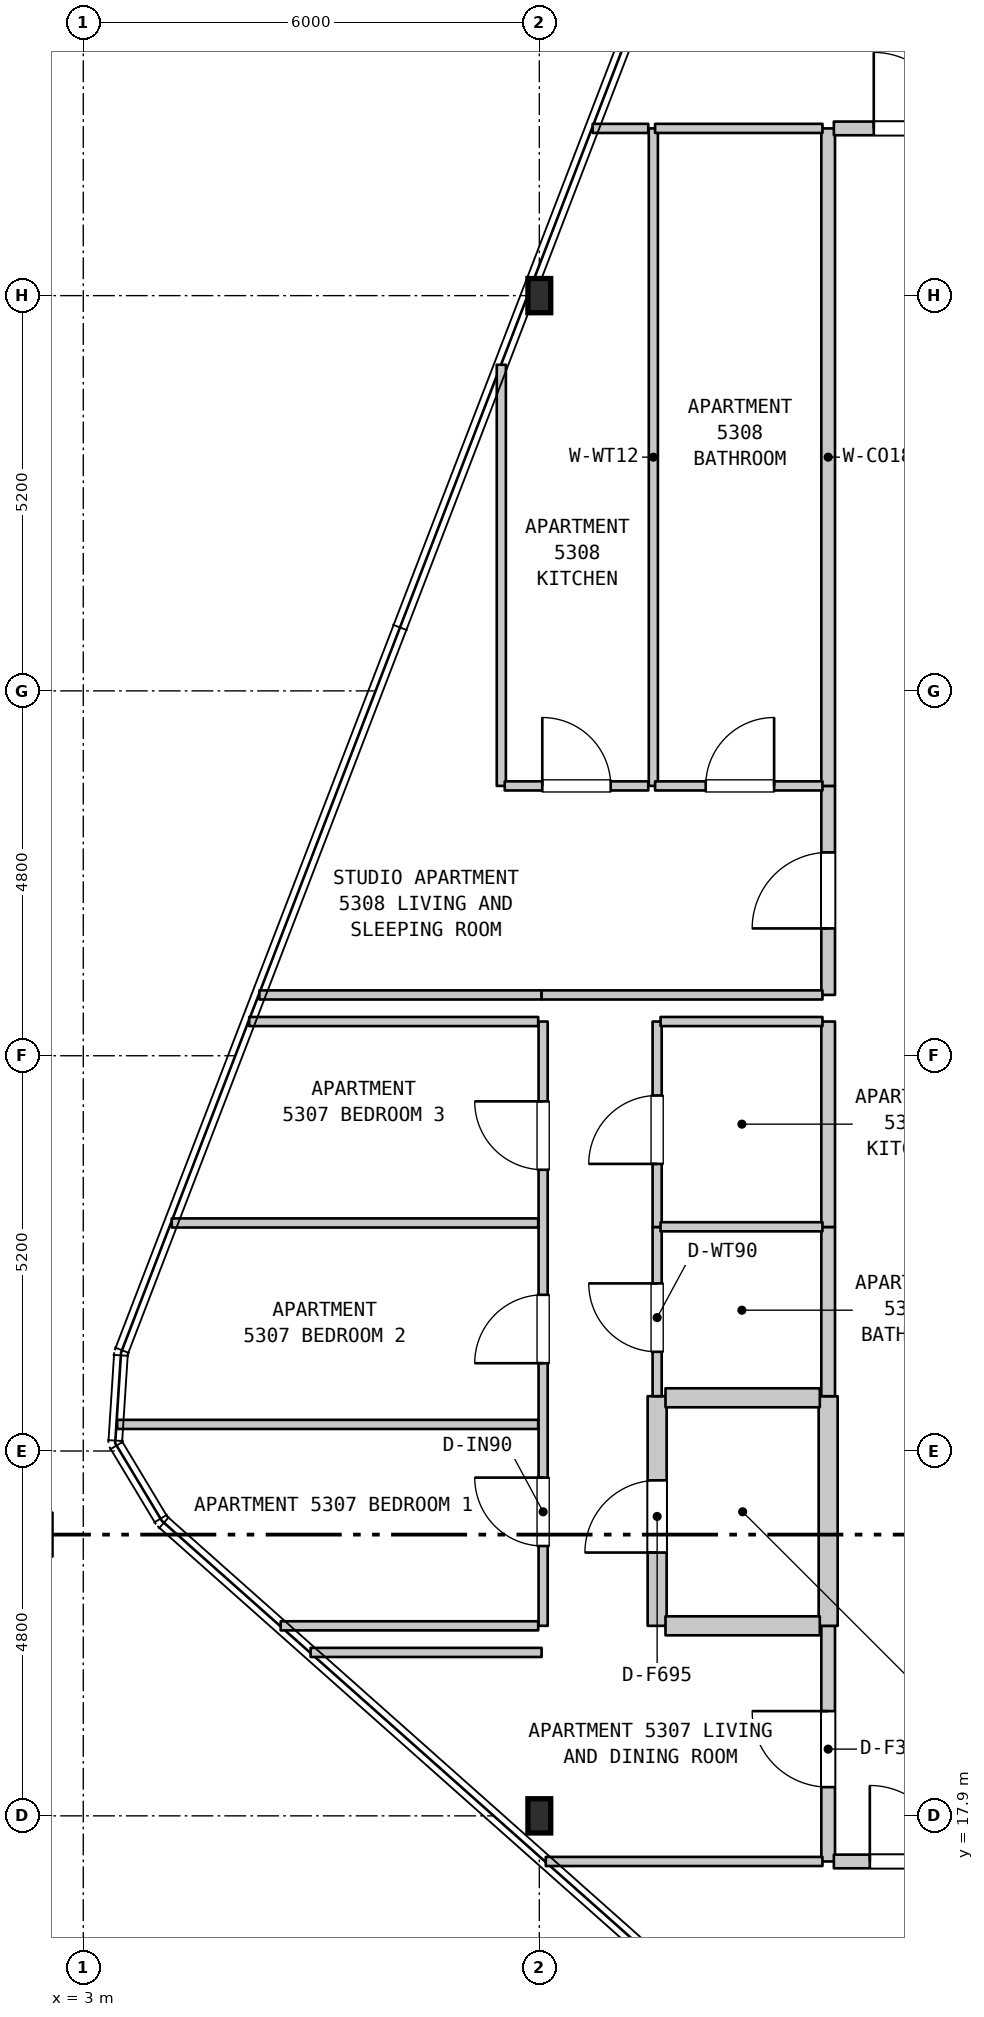
"""IFC4 building model, lengths in metres.
Left out: names, types, materials, properties, quantities, classifications, styles, units other than length and angle.
Written with IfcOpenShell. Run it as: python <this file> out.ifc"""

import sys

from ifc_helpers import new_model, si_unit, direction, frame, frame_2d, origin, origin_2d, place, context, subcontext, project, spatial, rectangle, i_section, extrude, element, fill, save


model = new_model("IFC4")
c1 = context("Model", 3, precision=1e-05, world=origin(), true_north=direction((0.0, 1.0)))
c2 = subcontext(c1, "Body", "Model", "MODEL_VIEW")
j1 = project(units=[si_unit("LENGTHUNIT", "METRE"), si_unit("PLANEANGLEUNIT", "RADIAN")], contexts=[c1])
p1 = place(None, origin())
s1 = spatial("IfcSite", under=j1, at=p1, CompositionType="ELEMENT")
p2 = place(p1, origin())
s2 = spatial("IfcBuilding", under=s1, at=p2, CompositionType="ELEMENT")
p3 = place(p2, frame((0.0, 0.0, 214.3)))
s3 = spatial("IfcBuildingStorey", under=s2, at=p3, CompositionType="ELEMENT", Elevation=214.3)
for number, where, z_axis, x_axis in (
    (1, (9.0, 17.9, 0.0), (0.0, 0.0, 1.0), (1.0, 0.0, 0.0)),
    (2, (9.0, 37.9, 0.0), (0.0, 0.0, 1.0), (1.0, 0.0, 0.0)),
):
    element("IfcColumn", number, at=place(p3, frame(where, z_axis=z_axis, x_axis=x_axis)), inside=s3, PredefinedType="COLUMN", context=c2, shape_type="SweptSolid", body=[
        extrude(i_section(OverallWidth=0.3, OverallDepth=0.45, WebThickness=0.014, FlangeThickness=0.026, FilletRadius=0.027, at=origin_2d()), origin(), (0.0, 0.0, 1.0), 3.7),
    ])
p4 = place(p3, frame((8.5, 31.45, 0.0), z_axis=(0.0, 0.0, 1.0), x_axis=(0.0, 1.0, 0.0)))
e3 = element("IfcWall", 3, at=p4, inside=s3, PredefinedType="PARTITIONING", context=c2, shape_type="SweptSolid", body=[
    extrude(rectangle(XDim=5.54, YDim=0.12, at=frame_2d((2.77, 0.0))), origin(), (0.0, 0.0, 1.0), 3.38),
])
p5 = place(p3, frame((9.05, 20.4, 0.0), z_axis=(0.0, 0.0, 1.0), x_axis=(0.0, 1.0, 0.0)))
e4 = element("IfcWall", 4, at=p5, inside=s3, PredefinedType="PARTITIONING", context=c2, shape_type="SweptSolid", body=[
    extrude(rectangle(XDim=7.95, YDim=0.12, at=frame_2d((3.975, 0.0))), origin(), (0.0, 0.0, 1.0), 2.78),
])
p6 = place(p5, frame((1.05, 0.0, 0.0)))
e5 = element("IfcOpeningElement", 5, at=p6, cuts=e4, PredefinedType="OPENING", context=c2, shape_type="SweptSolid", body=[
    extrude(rectangle(XDim=0.9, YDim=2.15, at=frame_2d((0.45, 1.075))), frame((0.0, 0.07, 0.0), z_axis=(0.0, -1.0, 0.0), x_axis=(1.0, 0.0, 0.0)), (0.0, 0.0, 1.0), 0.14),
])
p7 = place(p5, frame((3.455, 0.0, 0.0)))
e6 = element("IfcOpeningElement", 6, at=p7, cuts=e4, PredefinedType="OPENING", context=c2, shape_type="SweptSolid", body=[
    extrude(rectangle(XDim=0.9, YDim=2.15, at=frame_2d((0.45, 1.075))), frame((0.0, 0.07, 0.0), z_axis=(0.0, -1.0, 0.0), x_axis=(1.0, 0.0, 0.0)), (0.0, 0.0, 1.0), 0.14),
])
p8 = place(p5, frame((6.0, 0.0, 0.0)))
e7 = element("IfcOpeningElement", 7, at=p8, cuts=e4, PredefinedType="OPENING", context=c2, shape_type="SweptSolid", body=[
    extrude(rectangle(XDim=0.9, YDim=2.15, at=frame_2d((0.45, 1.075))), frame((0.0, 0.07, 0.0), z_axis=(0.0, -1.0, 0.0), x_axis=(1.0, 0.0, 0.0)), (0.0, 0.0, 1.0), 0.14),
])
p9 = place(p3, frame((10.5, 31.45, 0.0), z_axis=(0.0, 0.0, 1.0), x_axis=(0.0, 1.0, 0.0)))
e8 = element("IfcWall", 8, at=p9, inside=s3, PredefinedType="PARTITIONING", context=c2, shape_type="SweptSolid", body=[
    extrude(rectangle(XDim=8.65, YDim=0.12, at=frame_2d((4.325, 0.0))), origin(), (0.0, 0.0, 1.0), 3.38),
])
p10 = place(p3, frame((10.55, 20.4, 0.0), z_axis=(0.0, 0.0, 1.0), x_axis=(0.0, 1.0, 0.0)))
e9 = element("IfcWall", 9, at=p10, inside=s3, PredefinedType="STANDARD", context=c2, shape_type="SweptSolid", body=[
    extrude(rectangle(XDim=3.021, YDim=0.25, at=frame_2d((1.51, 0.0))), origin(), (0.0, 0.0, 1.0), 3.38),
])
p11 = place(p10, frame((0.964, 0.0, 0.0)))
e10 = element("IfcOpeningElement", 10, at=p11, cuts=e9, PredefinedType="OPENING", context=c2, shape_type="SweptSolid", body=[
    extrude(rectangle(XDim=0.95, YDim=2.15, at=frame_2d((0.475, 1.075))), frame((0.0, 0.135, 0.0), z_axis=(0.0, -1.0, 0.0), x_axis=(1.0, 0.0, 0.0)), (0.0, 0.0, 1.0), 0.27),
])
p12 = place(p3, frame((10.55, 23.421, 0.0), z_axis=(0.0, 0.0, 1.0), x_axis=(0.0, 1.0, 0.0)))
e11 = element("IfcWall", 11, at=p12, inside=s3, PredefinedType="PARTITIONING", context=c2, shape_type="SweptSolid", body=[
    extrude(rectangle(XDim=2.226, YDim=0.12, at=frame_2d((1.113, 0.0))), origin(), (0.0, 0.0, 1.0), 3.38),
])
p13 = place(p12, frame((0.584, 0.0, 0.0)))
e12 = element("IfcOpeningElement", 12, at=p13, cuts=e11, PredefinedType="OPENING", context=c2, shape_type="SweptSolid", body=[
    extrude(rectangle(XDim=0.9, YDim=2.1, at=frame_2d((0.45, 1.05))), frame((0.0, 0.07, 0.0), z_axis=(0.0, -1.0, 0.0), x_axis=(1.0, 0.0, 0.0)), (0.0, 0.0, 1.0), 0.14),
])
p14 = place(p3, frame((10.55, 25.647, 0.0), z_axis=(0.0, 0.0, 1.0), x_axis=(0.0, 1.0, 0.0)))
e13 = element("IfcWall", 13, at=p14, inside=s3, PredefinedType="PARTITIONING", context=c2, shape_type="SweptSolid", body=[
    extrude(rectangle(XDim=2.703, YDim=0.12, at=frame_2d((1.352, 0.0))), origin(), (0.0, 0.0, 1.0), 3.38),
])
p15 = place(p14, frame((0.83, 0.0, 0.0)))
e14 = element("IfcOpeningElement", 14, at=p15, cuts=e13, PredefinedType="OPENING", context=c2, shape_type="SweptSolid", body=[
    extrude(rectangle(XDim=0.9, YDim=2.15, at=frame_2d((0.45, 1.075))), frame((0.0, 0.07, 0.0), z_axis=(0.0, -1.0, 0.0), x_axis=(1.0, 0.0, 0.0)), (0.0, 0.0, 1.0), 0.14),
])
p16 = place(p3, frame((12.8, 17.3, 0.0), z_axis=(0.0, 0.0, 1.0), x_axis=(0.0, 1.0, 0.0)))
e15 = element("IfcWall", 15, at=p16, inside=s3, PredefinedType="STANDARD", context=c2, shape_type="SweptSolid", body=[
    extrude(rectangle(XDim=3.1, YDim=0.18, at=frame_2d((1.55, 0.0))), origin(), (0.0, 0.0, 1.0), 3.38),
])
p17 = place(p16, frame((0.978, 0.0, 0.0)))
e16 = element("IfcOpeningElement", 16, at=p17, cuts=e15, PredefinedType="OPENING", context=c2, shape_type="SweptSolid", body=[
    extrude(rectangle(XDim=1.0, YDim=2.15, at=frame_2d((0.5, 1.075))), frame((0.0, 0.1, 0.0), z_axis=(0.0, -1.0, 0.0), x_axis=(1.0, 0.0, 0.0)), (0.0, 0.0, 1.0), 0.2),
])
p18 = place(p3, frame((12.8, 20.4, 0.0), z_axis=(0.0, 0.0, 1.0), x_axis=(0.0, 1.0, 0.0)))
e17 = element("IfcWall", 17, at=p18, inside=s3, PredefinedType="STANDARD", context=c2, shape_type="SweptSolid", body=[
    extrude(rectangle(XDim=3.021, YDim=0.25, at=frame_2d((1.51, 0.0))), origin(), (0.0, 0.0, 1.0), 3.38),
])
p19 = place(p3, frame((12.8, 23.421, 0.0), z_axis=(0.0, 0.0, 1.0), x_axis=(0.0, 1.0, 0.0)))
e18 = element("IfcWall", 18, at=p19, inside=s3, PredefinedType="STANDARD", context=c2, shape_type="SweptSolid", body=[
    extrude(rectangle(XDim=2.226, YDim=0.18, at=frame_2d((1.113, 0.0))), origin(), (0.0, 0.0, 1.0), 3.38),
])
p20 = place(p3, frame((12.8, 25.647, 0.0), z_axis=(0.0, 0.0, 1.0), x_axis=(0.0, 1.0, 0.0)))
e19 = element("IfcWall", 19, at=p20, inside=s3, PredefinedType="STANDARD", context=c2, shape_type="SweptSolid", body=[
    extrude(rectangle(XDim=2.703, YDim=0.18, at=frame_2d((1.352, 0.0))), origin(), (0.0, 0.0, 1.0), 3.38),
])
p21 = place(p3, frame((12.8, 28.7, 0.0), z_axis=(0.0, 0.0, 1.0), x_axis=(0.0, 1.0, 0.0)))
e20 = element("IfcWall", 20, at=p21, inside=s3, PredefinedType="STANDARD", context=c2, shape_type="SweptSolid", body=[
    extrude(rectangle(XDim=2.75, YDim=0.18, at=frame_2d((1.375, 0.0))), origin(), (0.0, 0.0, 1.0), 3.38),
])
p22 = place(p21, frame((0.875, 0.0, 0.0)))
e21 = element("IfcOpeningElement", 21, at=p22, cuts=e20, PredefinedType="OPENING", context=c2, shape_type="SweptSolid", body=[
    extrude(rectangle(XDim=1.0, YDim=2.15, at=frame_2d((0.5, 1.075))), frame((0.0, 0.1, 0.0), z_axis=(0.0, -1.0, 0.0), x_axis=(1.0, 0.0, 0.0)), (0.0, 0.0, 1.0), 0.2),
])
p23 = place(p3, frame((12.8, 31.45, 0.0), z_axis=(0.0, 0.0, 1.0), x_axis=(0.0, 1.0, 0.0)))
e22 = element("IfcWall", 22, at=p23, inside=s3, PredefinedType="STANDARD", context=c2, shape_type="SweptSolid", body=[
    extrude(rectangle(XDim=8.65, YDim=0.18, at=frame_2d((4.325, 0.0))), origin(), (0.0, 0.0, 1.0), 3.38),
])
p24 = place(p3, frame((9.085, 17.3, 0.0), z_axis=(0.0, 0.0, 1.0), x_axis=(1.0, 0.0, 0.0)))
e23 = element("IfcWall", 23, at=p24, inside=s3, PredefinedType="PARTITIONING", context=c2, shape_type="SweptSolid", body=[
    extrude(rectangle(XDim=3.64, YDim=0.12, at=frame_2d((1.82, 0.0))), origin(), (0.0, 0.0, 1.0), 3.38),
])
p25 = place(p3, frame((12.875, 17.3, 0.0), z_axis=(0.0, 0.0, 1.0), x_axis=(1.0, 0.0, 0.0)))
e24 = element("IfcWall", 24, at=p25, inside=s3, PredefinedType="STANDARD", context=c2, shape_type="SweptSolid", body=[
    extrude(rectangle(XDim=3.58, YDim=0.18, at=frame_2d((1.79, 0.0))), origin(), (0.0, 0.0, 1.0), 3.38),
])
p26 = place(p25, frame((0.473, 0.0, 0.0)))
e25 = element("IfcOpeningElement", 25, at=p26, cuts=e24, PredefinedType="OPENING", context=c2, shape_type="SweptSolid", body=[
    extrude(rectangle(XDim=1.0, YDim=2.15, at=frame_2d((0.5, 1.075))), frame((0.0, 0.1, 0.0), z_axis=(0.0, -1.0, 0.0), x_axis=(1.0, 0.0, 0.0)), (0.0, 0.0, 1.0), 0.2),
])
p27 = place(p3, frame((5.991, 20.05, 0.0), z_axis=(0.0, 0.0, 1.0), x_axis=(1.0, 0.0, 0.0)))
e26 = element("IfcWall", 26, at=p27, inside=s3, PredefinedType="PARTITIONING", context=c2, shape_type="SweptSolid", body=[
    extrude(rectangle(XDim=3.039, YDim=0.12, at=frame_2d((1.52, 0.0))), origin(), (0.0, 0.0, 1.0), 3.38),
])
p28 = place(p3, frame((5.597, 20.4, 0.0), z_axis=(0.0, 0.0, 1.0), x_axis=(1.0, 0.0, 0.0)))
e27 = element("IfcWall", 27, at=p28, inside=s3, PredefinedType="PARTITIONING", context=c2, shape_type="SweptSolid", body=[
    extrude(rectangle(XDim=3.388, YDim=0.12, at=frame_2d((1.694, 0.0))), origin(), (0.0, 0.0, 1.0), 3.38),
])
p29 = place(p3, frame((10.66, 20.4, 0.0), z_axis=(0.0, 0.0, 1.0), x_axis=(1.0, 0.0, 0.0)))
e28 = element("IfcWall", 28, at=p29, inside=s3, PredefinedType="STANDARD", context=c2, shape_type="SweptSolid", body=[
    extrude(rectangle(XDim=2.03, YDim=0.25, at=frame_2d((1.015, 0.0))), origin(), (0.0, 0.0, 1.0), 3.38),
])
p30 = place(p3, frame((3.446, 23.05, 0.0), z_axis=(0.0, 0.0, 1.0), x_axis=(1.0, 0.0, 0.0)))
e29 = element("IfcWall", 29, at=p30, inside=s3, PredefinedType="PARTITIONING", context=c2, shape_type="SweptSolid", body=[
    extrude(rectangle(XDim=5.539, YDim=0.12, at=frame_2d((2.77, 0.0))), origin(), (0.0, 0.0, 1.0), 3.38),
])
p31 = place(p3, frame((10.66, 23.4, 0.0), z_axis=(0.0, 0.0, 1.0), x_axis=(1.0, 0.0, 0.0)))
e30 = element("IfcWall", 30, at=p31, inside=s3, PredefinedType="STANDARD", context=c2, shape_type="SweptSolid", body=[
    extrude(rectangle(XDim=2.03, YDim=0.25, at=frame_2d((1.015, 0.0))), origin(), (0.0, 0.0, 1.0), 3.38),
])
p32 = place(p3, frame((10.595, 25.65, 0.0), z_axis=(0.0, 0.0, 1.0), x_axis=(1.0, 0.0, 0.0)))
e31 = element("IfcWall", 31, at=p32, inside=s3, PredefinedType="PARTITIONING", context=c2, shape_type="SweptSolid", body=[
    extrude(rectangle(XDim=2.13, YDim=0.12, at=frame_2d((1.065, 0.0))), origin(), (0.0, 0.0, 1.0), 3.38),
])
p33 = place(p3, frame((4.164, 25.7, 0.0), z_axis=(0.0, 0.0, 1.0), x_axis=(1.0, 0.0, 0.0)))
e32 = element("IfcWall", 32, at=p33, inside=s3, PredefinedType="PARTITIONING", context=c2, shape_type="SweptSolid", body=[
    extrude(rectangle(XDim=4.821, YDim=0.12, at=frame_2d((2.411, 0.0))), origin(), (0.0, 0.0, 1.0), 3.38),
])
p34 = place(p3, frame((5.183, 28.35, 0.0), z_axis=(0.0, 0.0, 1.0), x_axis=(1.0, 0.0, 0.0)))
e33 = element("IfcWall", 33, at=p34, inside=s3, PredefinedType="PARTITIONING", context=c2, shape_type="SweptSolid", body=[
    extrude(rectangle(XDim=3.802, YDim=0.12, at=frame_2d((1.901, 0.0))), origin(), (0.0, 0.0, 1.0), 3.38),
])
p35 = place(p3, frame((10.595, 28.35, 0.0), z_axis=(0.0, 0.0, 1.0), x_axis=(1.0, 0.0, 0.0)))
e34 = element("IfcWall", 34, at=p35, inside=s3, PredefinedType="PARTITIONING", context=c2, shape_type="SweptSolid", body=[
    extrude(rectangle(XDim=2.13, YDim=0.12, at=frame_2d((1.065, 0.0))), origin(), (0.0, 0.0, 1.0), 3.38),
])
p36 = place(p3, frame((5.317, 28.7, 0.0), z_axis=(0.0, 0.0, 1.0), x_axis=(1.0, 0.0, 0.0)))
e35 = element("IfcWall", 35, at=p36, inside=s3, PredefinedType="PARTITIONING", context=c2, shape_type="SweptSolid", body=[
    extrude(rectangle(XDim=3.713, YDim=0.12, at=frame_2d((1.856, 0.0))), origin(), (0.0, 0.0, 1.0), 3.38),
])
p37 = place(p3, frame((9.03, 28.7, 0.0), z_axis=(0.0, 0.0, 1.0), x_axis=(1.0, 0.0, 0.0)))
e36 = element("IfcWall", 36, at=p37, inside=s3, PredefinedType="PARTITIONING", context=c2, shape_type="SweptSolid", body=[
    extrude(rectangle(XDim=3.695, YDim=0.12, at=frame_2d((1.848, 0.0))), origin(), (0.0, 0.0, 1.0), 3.38),
])
p38 = place(p3, frame((8.545, 31.45, 0.0), z_axis=(0.0, 0.0, 1.0), x_axis=(1.0, 0.0, 0.0)))
e37 = element("IfcWall", 37, at=p38, inside=s3, PredefinedType="PARTITIONING", context=c2, shape_type="SweptSolid", body=[
    extrude(rectangle(XDim=1.888, YDim=0.12, at=frame_2d((0.944, 0.0))), origin(), (0.0, 0.0, 1.0), 3.38),
])
p39 = place(p38, frame((0.494, 0.0, 0.0)))
e38 = element("IfcOpeningElement", 38, at=p39, cuts=e37, PredefinedType="OPENING", context=c2, shape_type="SweptSolid", body=[
    extrude(rectangle(XDim=0.9, YDim=2.15, at=frame_2d((0.45, 1.075))), frame((0.0, 0.07, 0.0), z_axis=(0.0, -1.0, 0.0), x_axis=(1.0, 0.0, 0.0)), (0.0, 0.0, 1.0), 0.14),
])
p40 = place(p3, frame((10.523, 31.45, 0.0), z_axis=(0.0, 0.0, 1.0), x_axis=(1.0, 0.0, 0.0)))
e39 = element("IfcWall", 39, at=p40, inside=s3, PredefinedType="PARTITIONING", context=c2, shape_type="SweptSolid", body=[
    extrude(rectangle(XDim=2.202, YDim=0.12, at=frame_2d((1.101, 0.0))), origin(), (0.0, 0.0, 1.0), 3.38),
])
p41 = place(p40, frame((0.666, 0.0, 0.0)))
e40 = element("IfcOpeningElement", 40, at=p41, cuts=e39, PredefinedType="OPENING", context=c2, shape_type="SweptSolid", body=[
    extrude(rectangle(XDim=0.9, YDim=2.1, at=frame_2d((0.45, 1.05))), frame((0.0, 0.07, 0.0), z_axis=(0.0, -1.0, 0.0), x_axis=(1.0, 0.0, 0.0)), (0.0, 0.0, 1.0), 0.14),
])
p42 = place(p3, frame((9.702, 40.1, 0.0), z_axis=(0.0, 0.0, 1.0), x_axis=(1.0, 0.0, 0.0)))
e41 = element("IfcWall", 41, at=p42, inside=s3, PredefinedType="PARTITIONING", context=c2, shape_type="SweptSolid", body=[
    extrude(rectangle(XDim=0.731, YDim=0.12, at=frame_2d((0.366, 0.0))), origin(), (0.0, 0.0, 1.0), 3.38),
])
p43 = place(p3, frame((10.523, 40.1, 0.0), z_axis=(0.0, 0.0, 1.0), x_axis=(1.0, 0.0, 0.0)))
e42 = element("IfcWall", 42, at=p43, inside=s3, PredefinedType="PARTITIONING", context=c2, shape_type="SweptSolid", body=[
    extrude(rectangle(XDim=2.202, YDim=0.12, at=frame_2d((1.101, 0.0))), origin(), (0.0, 0.0, 1.0), 3.38),
])
p44 = place(p3, frame((12.875, 40.1, 0.0), z_axis=(0.0, 0.0, 1.0), x_axis=(1.0, 0.0, 0.0)))
e43 = element("IfcWall", 43, at=p44, inside=s3, PredefinedType="STANDARD", context=c2, shape_type="SweptSolid", body=[
    extrude(rectangle(XDim=2.125, YDim=0.18, at=frame_2d((1.062, 0.0))), origin(), (0.0, 0.0, 1.0), 3.38),
])
p45 = place(p44, frame((0.525, 0.0, 0.0)))
e44 = element("IfcOpeningElement", 44, at=p45, cuts=e43, PredefinedType="OPENING", context=c2, shape_type="SweptSolid", body=[
    extrude(rectangle(XDim=1.0, YDim=2.15, at=frame_2d((0.5, 1.075))), frame((0.0, 0.1, 0.0), z_axis=(0.0, -1.0, 0.0), x_axis=(1.0, 0.0, 0.0)), (0.0, 0.0, 1.0), 0.2),
])
p46 = place(p6, origin())
e45 = element("IfcDoor", 45, at=p46, inside=s3, OperationType="SINGLE_SWING_RIGHT", PredefinedType="DOOR", context=c2, shape_type="SweptSolid", body=[
    extrude(rectangle(XDim=0.9, YDim=2.15, at=frame_2d((0.45, 1.075))), frame((0.0, 0.025, 0.0), z_axis=(0.0, -1.0, 0.0), x_axis=(1.0, 0.0, 0.0)), (0.0, 0.0, 1.0), 0.05),
])
fill(e5, e45)
p47 = place(p7, origin())
e46 = element("IfcDoor", 46, at=p47, inside=s3, OperationType="SINGLE_SWING_LEFT", PredefinedType="DOOR", context=c2, shape_type="SweptSolid", body=[
    extrude(rectangle(XDim=0.9, YDim=2.15, at=frame_2d((0.45, 1.075))), frame((0.0, 0.025, 0.0), z_axis=(0.0, -1.0, 0.0), x_axis=(1.0, 0.0, 0.0)), (0.0, 0.0, 1.0), 0.05),
])
fill(e6, e46)
p48 = place(p8, origin())
e47 = element("IfcDoor", 47, at=p48, inside=s3, OperationType="SINGLE_SWING_RIGHT", PredefinedType="DOOR", context=c2, shape_type="SweptSolid", body=[
    extrude(rectangle(XDim=0.9, YDim=2.15, at=frame_2d((0.45, 1.075))), frame((0.0, 0.025, 0.0), z_axis=(0.0, -1.0, 0.0), x_axis=(1.0, 0.0, 0.0)), (0.0, 0.0, 1.0), 0.05),
])
fill(e7, e47)
p49 = place(p11, origin())
e48 = element("IfcDoor", 48, at=p49, inside=s3, OperationType="SINGLE_SWING_LEFT", PredefinedType="DOOR", context=c2, shape_type="SweptSolid", body=[
    extrude(rectangle(XDim=0.95, YDim=2.15, at=frame_2d((0.475, 1.075))), frame((0.0, 0.025, 0.0), z_axis=(0.0, -1.0, 0.0), x_axis=(1.0, 0.0, 0.0)), (0.0, 0.0, 1.0), 0.05),
])
fill(e10, e48)
p50 = place(p13, origin())
e49 = element("IfcDoor", 49, at=p50, inside=s3, OperationType="SINGLE_SWING_RIGHT", PredefinedType="DOOR", context=c2, shape_type="SweptSolid", body=[
    extrude(rectangle(XDim=0.9, YDim=2.1, at=frame_2d((0.45, 1.05))), frame((0.0, 0.025, 0.0), z_axis=(0.0, -1.0, 0.0), x_axis=(1.0, 0.0, 0.0)), (0.0, 0.0, 1.0), 0.05),
])
fill(e12, e49)
p51 = place(p15, origin())
e50 = element("IfcDoor", 50, at=p51, inside=s3, OperationType="SINGLE_SWING_LEFT", PredefinedType="DOOR", context=c2, shape_type="SweptSolid", body=[
    extrude(rectangle(XDim=0.9, YDim=2.15, at=frame_2d((0.45, 1.075))), frame((0.0, 0.025, 0.0), z_axis=(0.0, -1.0, 0.0), x_axis=(1.0, 0.0, 0.0)), (0.0, 0.0, 1.0), 0.05),
])
fill(e14, e50)
p52 = place(p17, origin())
e51 = element("IfcDoor", 51, at=p52, inside=s3, OperationType="SINGLE_SWING_RIGHT", PredefinedType="DOOR", context=c2, shape_type="SweptSolid", body=[
    extrude(rectangle(XDim=1.0, YDim=2.15, at=frame_2d((0.5, 1.075))), frame((0.0, 0.025, 0.0), z_axis=(0.0, -1.0, 0.0), x_axis=(1.0, 0.0, 0.0)), (0.0, 0.0, 1.0), 0.05),
])
fill(e16, e51)
p53 = place(p22, origin())
e52 = element("IfcDoor", 52, at=p53, inside=s3, OperationType="SINGLE_SWING_LEFT", PredefinedType="DOOR", context=c2, shape_type="SweptSolid", body=[
    extrude(rectangle(XDim=1.0, YDim=2.15, at=frame_2d((0.5, 1.075))), frame((0.0, 0.025, 0.0), z_axis=(0.0, -1.0, 0.0), x_axis=(1.0, 0.0, 0.0)), (0.0, 0.0, 1.0), 0.05),
])
fill(e21, e52)
p54 = place(p26, origin())
e53 = element("IfcDoor", 53, at=p54, inside=s3, OperationType="SINGLE_SWING_LEFT", PredefinedType="DOOR", context=c2, shape_type="SweptSolid", body=[
    extrude(rectangle(XDim=1.0, YDim=2.15, at=frame_2d((0.5, 1.075))), frame((0.0, 0.025, 0.0), z_axis=(0.0, -1.0, 0.0), x_axis=(1.0, 0.0, 0.0)), (0.0, 0.0, 1.0), 0.05),
])
fill(e25, e53)
p55 = place(p39, origin())
e54 = element("IfcDoor", 54, at=p55, inside=s3, OperationType="SINGLE_SWING_LEFT", PredefinedType="DOOR", context=c2, shape_type="SweptSolid", body=[
    extrude(rectangle(XDim=0.9, YDim=2.15, at=frame_2d((0.45, 1.075))), frame((0.0, 0.025, 0.0), z_axis=(0.0, -1.0, 0.0), x_axis=(1.0, 0.0, 0.0)), (0.0, 0.0, 1.0), 0.05),
])
fill(e38, e54)
p56 = place(p41, origin())
e55 = element("IfcDoor", 55, at=p56, inside=s3, OperationType="SINGLE_SWING_RIGHT", PredefinedType="DOOR", context=c2, shape_type="SweptSolid", body=[
    extrude(rectangle(XDim=0.9, YDim=2.1, at=frame_2d((0.45, 1.05))), frame((0.0, 0.025, 0.0), z_axis=(0.0, -1.0, 0.0), x_axis=(1.0, 0.0, 0.0)), (0.0, 0.0, 1.0), 0.05),
])
fill(e40, e55)
p57 = place(p45, origin())
e56 = element("IfcDoor", 56, at=p57, inside=s3, OperationType="SINGLE_SWING_LEFT", PredefinedType="DOOR", context=c2, shape_type="SweptSolid", body=[
    extrude(rectangle(XDim=1.0, YDim=2.15, at=frame_2d((0.5, 1.075))), frame((0.0, 0.025, 0.0), z_axis=(0.0, -1.0, 0.0), x_axis=(1.0, 0.0, 0.0)), (0.0, 0.0, 1.0), 0.05),
])
fill(e44, e56)
save(model, sys.argv[1])
